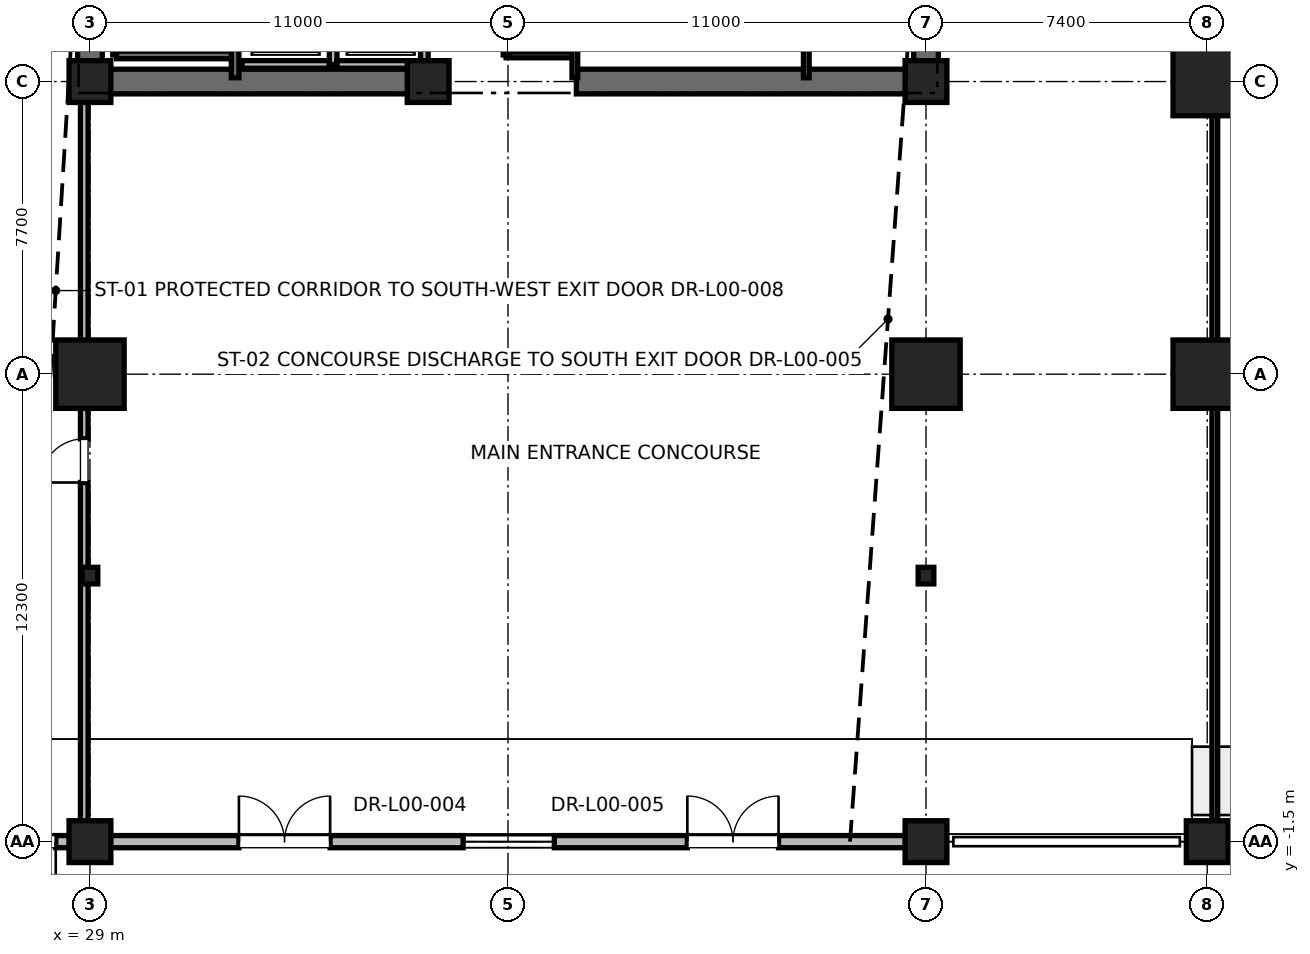
"""IFC4 building model, lengths in metres.
Left out: names, types, materials, properties, quantities, classifications, styles, units other than length and angle.
Written with IfcOpenShell. Run it as: python <this file> out.ifc"""

import sys

from ifc_helpers import new_model, si_unit, direction, frame, frame_2d, origin, origin_2d, place, context, subcontext, project, spatial, rectangle, i_section, extrude, element, fill, save


model = new_model("IFC4")
c1 = context("Model", 3, precision=1e-05, world=origin(), true_north=direction((0.0, 1.0)))
c2 = subcontext(c1, "Body", "Model", "MODEL_VIEW")
j1 = project(units=[si_unit("LENGTHUNIT", "METRE"), si_unit("PLANEANGLEUNIT", "RADIAN")], contexts=[c1])
p1 = place(None, origin())
s1 = spatial("IfcSite", under=j1, at=p1, CompositionType="ELEMENT")
p2 = place(p1, origin())
s2 = spatial("IfcBuilding", under=s1, at=p2, CompositionType="ELEMENT")
p3 = place(p2, origin())
s3 = spatial("IfcBuildingStorey", under=s2, at=p3, CompositionType="ELEMENT", Elevation=0.0)
for number, where, z_axis, x_axis in (
    (1, (29.0, 10.8, 0.0), (0.0, 0.0, 1.0), (1.0, 0.0, 0.0)),
    (2, (51.0, 10.8, 0.0), (0.0, 0.0, 1.0), (1.0, 0.0, 0.0)),
    (3, (58.4, 18.5, 0.0), (0.0, 0.0, 1.0), (1.0, 0.0, 0.0)),
    (4, (58.4, 10.8, 0.0), (0.0, 0.0, 1.0), (1.0, 0.0, 0.0)),
):
    element("IfcColumn", number, at=place(p3, frame(where, z_axis=z_axis, x_axis=x_axis)), inside=s3, PredefinedType="COLUMN", context=c2, shape_type="SweptSolid", body=[
        extrude(rectangle(XDim=1.8, YDim=1.8, at=origin_2d()), origin(), (0.0, 0.0, 1.0), 6.0),
    ])
for number, where, z_axis, x_axis in (
    (5, (29.0, 5.5, 0.0), (0.0, 0.0, 1.0), (1.0, 0.0, 0.0)),
    (6, (51.0, 5.5, 0.0), (0.0, 0.0, 1.0), (1.0, 0.0, 0.0)),
):
    element("IfcColumn", number, at=place(p3, frame(where, z_axis=z_axis, x_axis=x_axis)), inside=s3, PredefinedType="COLUMN", context=c2, shape_type="SweptSolid", body=[
        extrude(i_section(OverallWidth=0.412, OverallDepth=0.437, WebThickness=0.036, FlangeThickness=0.058, FilletRadius=0.015, at=origin_2d()), origin(), (0.0, 0.0, 1.0), 6.0),
    ])
for number, where, z_axis, x_axis in (
    (7, (29.0, 18.5, 0.0), (0.0, 0.0, 1.0), (1.0, 0.0, 0.0)),
    (8, (51.0, 18.5, 0.0), (0.0, 0.0, 1.0), (1.0, 0.0, 0.0)),
    (9, (37.9, 18.5, 0.0), (0.0, 0.0, 1.0), (1.0, 0.0, 0.0)),
):
    element("IfcColumn", number, at=place(p3, frame(where, z_axis=z_axis, x_axis=x_axis)), inside=s3, PredefinedType="PILASTER", context=c2, shape_type="SweptSolid", body=[
        extrude(rectangle(XDim=1.1, YDim=1.1, at=origin_2d()), origin(), (0.0, 0.0, 1.0), 6.0),
    ])
for number, where, z_axis, x_axis in (
    (10, (29.0, -1.5, 0.0), (0.0, 0.0, 1.0), (1.0, 0.0, 0.0)),
    (11, (51.0, -1.5, 0.0), (0.0, 0.0, 1.0), (1.0, 0.0, 0.0)),
    (12, (58.4, -1.5, 0.0), (0.0, 0.0, 1.0), (1.0, 0.0, 0.0)),
):
    element("IfcColumn", number, at=place(p3, frame(where, z_axis=z_axis, x_axis=x_axis)), inside=s3, PredefinedType="COLUMN", context=c2, shape_type="SweptSolid", body=[
        extrude(rectangle(XDim=1.1, YDim=1.1, at=origin_2d()), origin(), (0.0, 0.0, 1.0), 6.0),
    ])
for number, where, z_axis, x_axis in (
    (13, (29.0, 18.5, 0.0), (0.0, 0.0, 1.0), (1.0, 0.0, 0.0)),
    (14, (41.8, 18.5, 0.0), (0.0, 0.0, 1.0), (1.0, 0.0, 0.0)),
):
    element("IfcWall", number, at=place(p3, frame(where, z_axis=z_axis, x_axis=x_axis)), inside=s3, PredefinedType="SHEAR", context=c2, shape_type="SweptSolid", body=[
        extrude(rectangle(XDim=9.2, YDim=0.65, at=frame_2d((4.6, 0.0))), origin(), (0.0, 0.0, 1.0), 5.72),
    ])
p4 = place(p3, frame((29.0, 18.5, 0.0), z_axis=(0.0, 0.0, 1.0), x_axis=(0.0, 1.0, 0.0)))
e15 = element("IfcWall", 15, at=p4, inside=s3, PredefinedType="SHEAR", context=c2, shape_type="SweptSolid", body=[
    extrude(rectangle(XDim=8.8, YDim=0.65, at=frame_2d((4.4, 0.0))), origin(), (0.0, 0.0, 1.0), 5.72),
])
p5 = place(p3, frame((51.0, 18.5, 0.0), z_axis=(0.0, 0.0, 1.0), x_axis=(0.0, 1.0, 0.0)))
e16 = element("IfcWall", 16, at=p5, inside=s3, PredefinedType="SHEAR", context=c2, shape_type="SweptSolid", body=[
    extrude(rectangle(XDim=5.8, YDim=0.65, at=frame_2d((2.9, 0.0))), origin(), (0.0, 0.0, 1.0), 5.72),
])
p6 = place(p3, frame((28.46, -1.5, 0.0), z_axis=(0.0, 0.0, 1.0), x_axis=(-1.0, 0.0, 0.0)))
e17 = element("IfcWall", 17, at=p6, inside=s3, PredefinedType="SOLIDWALL", context=c2, shape_type="SweptSolid", body=[
    extrude(rectangle(XDim=6.32, YDim=0.32, at=frame_2d((3.16, 0.0))), origin(), (0.0, 0.0, 1.0), 4.33),
])
p7 = place(p6, frame((0.36, 0.0, 0.0)))
e18 = element("IfcOpeningElement", 18, at=p7, cuts=e17, PredefinedType="OPENING", context=c2, shape_type="SweptSolid", body=[
    extrude(rectangle(XDim=1.8, YDim=2.4, at=frame_2d((0.9, 1.2))), frame((0.0, 0.16, 0.0), z_axis=(0.0, -1.0, 0.0), x_axis=(1.0, 0.0, 0.0)), (0.0, 0.0, 1.0), 0.32),
])
p8 = place(p3, frame((29.54, -1.5, 0.0), z_axis=(0.0, 0.0, 1.0), x_axis=(1.0, 0.0, 0.0)))
e19 = element("IfcWall", 19, at=p8, inside=s3, PredefinedType="SOLIDWALL", context=c2, shape_type="SweptSolid", body=[
    extrude(rectangle(XDim=20.92, YDim=0.32, at=frame_2d((10.46, 0.0))), origin(), (0.0, 0.0, 1.0), 4.33),
])
p9 = place(p8, frame((3.38, 0.0, 0.0)))
e20 = element("IfcOpeningElement", 20, at=p9, cuts=e19, PredefinedType="OPENING", context=c2, shape_type="SweptSolid", body=[
    extrude(rectangle(XDim=2.4, YDim=2.8, at=frame_2d((1.2, 1.4))), frame((0.0, 0.16, 0.0), z_axis=(0.0, -1.0, 0.0), x_axis=(1.0, 0.0, 0.0)), (0.0, 0.0, 1.0), 0.32),
])
p10 = place(p8, frame((9.28, 0.0, 0.9)))
e21 = element("IfcOpeningElement", 21, at=p10, cuts=e19, PredefinedType="OPENING", context=c2, shape_type="SweptSolid", body=[
    extrude(rectangle(XDim=2.4, YDim=2.4, at=frame_2d((1.2, 1.2))), frame((0.0, 0.16, 0.0), z_axis=(0.0, -1.0, 0.0), x_axis=(1.0, 0.0, 0.0)), (0.0, 0.0, 1.0), 0.32),
])
p11 = place(p8, frame((15.18, 0.0, 0.0)))
e22 = element("IfcOpeningElement", 22, at=p11, cuts=e19, PredefinedType="OPENING", context=c2, shape_type="SweptSolid", body=[
    extrude(rectangle(XDim=2.4, YDim=2.8, at=frame_2d((1.2, 1.4))), frame((0.0, 0.16, 0.0), z_axis=(0.0, -1.0, 0.0), x_axis=(1.0, 0.0, 0.0)), (0.0, 0.0, 1.0), 0.32),
])
p12 = place(p3, frame((29.7, 19.2, 0.0), z_axis=(0.0, 0.0, 1.0), x_axis=(0.0, 1.0, 0.0)))
e23 = element("IfcWall", 23, at=p12, inside=s3, PredefinedType="SOLIDWALL", context=c2, shape_type="SweptSolid", body=[
    extrude(rectangle(XDim=8.15, YDim=0.2, at=frame_2d((4.075, 0.0))), origin(), (0.0, 0.0, 1.0), 5.72),
])
p13 = place(p3, frame((29.7, 19.2, 0.0), z_axis=(0.0, 0.0, 1.0), x_axis=(1.0, 0.0, 0.0)))
e24 = element("IfcWall", 24, at=p13, inside=s3, PredefinedType="SOLIDWALL", context=c2, shape_type="SweptSolid", body=[
    extrude(rectangle(XDim=3.12, YDim=0.2, at=frame_2d((1.56, 0.0))), origin(), (0.0, 0.0, 1.0), 5.72),
])
p14 = place(p3, frame((32.82, 18.6, 0.0), z_axis=(0.0, 0.0, 1.0), x_axis=(0.0, 1.0, 0.0)))
e25 = element("IfcWall", 25, at=p14, inside=s3, PredefinedType="SOLIDWALL", context=c2, shape_type="SweptSolid", body=[
    extrude(rectangle(XDim=8.78, YDim=0.2, at=frame_2d((4.39, 0.0))), origin(), (0.0, 0.0, 1.0), 5.72),
])
p15 = place(p3, frame((33.0, 18.95, 0.0), z_axis=(0.0, 0.0, 1.0), x_axis=(1.0, 0.0, 0.0)))
e26 = element("IfcWall", 26, at=p15, inside=s3, PredefinedType="SOLIDWALL", context=c2, shape_type="SweptSolid", body=[
    extrude(rectangle(XDim=2.3, YDim=0.2, at=frame_2d((1.15, 0.0))), origin(), (0.0, 0.0, 1.0), 5.72),
])
p16 = place(p3, frame((35.4, 18.95, 0.0), z_axis=(0.0, 0.0, 1.0), x_axis=(0.0, 1.0, 0.0)))
e27 = element("IfcWall", 27, at=p16, inside=s3, PredefinedType="SOLIDWALL", context=c2, shape_type="SweptSolid", body=[
    extrude(rectangle(XDim=2.6, YDim=0.2, at=frame_2d((1.3, 0.0))), origin(), (0.0, 0.0, 1.0), 5.72),
])
p17 = place(p3, frame((35.5, 18.95, 0.0), z_axis=(0.0, 0.0, 1.0), x_axis=(1.0, 0.0, 0.0)))
e28 = element("IfcWall", 28, at=p17, inside=s3, PredefinedType="SOLIDWALL", context=c2, shape_type="SweptSolid", body=[
    extrude(rectangle(XDim=2.3, YDim=0.2, at=frame_2d((1.15, 0.0))), origin(), (0.0, 0.0, 1.0), 4.5),
])
p18 = place(p3, frame((37.8, 18.95, 0.0), z_axis=(0.0, 0.0, 1.0), x_axis=(0.0, 1.0, 0.0)))
e29 = element("IfcWall", 29, at=p18, inside=s3, PredefinedType="SOLIDWALL", context=c2, shape_type="SweptSolid", body=[
    extrude(rectangle(XDim=2.6, YDim=0.2, at=frame_2d((1.3, 0.0))), origin(), (0.0, 0.0, 1.0), 4.5),
])
p19 = place(p3, frame((39.95, 19.2, 0.0), z_axis=(0.0, 0.0, 1.0), x_axis=(1.0, 0.0, 0.0)))
e30 = element("IfcWall", 30, at=p19, inside=s3, PredefinedType="PARTITIONING", context=c2, shape_type="SweptSolid", body=[
    extrude(rectangle(XDim=1.81, YDim=0.15, at=frame_2d((0.905, 0.0))), origin(), (0.0, 0.0, 1.0), 2.85),
])
p20 = place(p3, frame((41.76, 18.6, 0.0), z_axis=(0.0, 0.0, 1.0), x_axis=(0.0, 1.0, 0.0)))
e31 = element("IfcWall", 31, at=p20, inside=s3, PredefinedType="PARTITIONING", context=c2, shape_type="SweptSolid", body=[
    extrude(rectangle(XDim=3.6, YDim=0.15, at=frame_2d((1.8, 0.0))), origin(), (0.0, 0.0, 1.0), 2.85),
])
p21 = place(p3, frame((39.95, 19.2, 0.0), z_axis=(0.0, 0.0, 1.0), x_axis=(0.0, 1.0, 0.0)))
e32 = element("IfcWall", 32, at=p21, inside=s3, PredefinedType="PARTITIONING", context=c2, shape_type="SweptSolid", body=[
    extrude(rectangle(XDim=3.0, YDim=0.15, at=frame_2d((1.5, 0.0))), origin(), (0.0, 0.0, 1.0), 2.85),
])
p22 = place(p21, frame((1.05, 0.0, 0.0)))
e33 = element("IfcOpeningElement", 33, at=p22, cuts=e32, PredefinedType="OPENING", context=c2, shape_type="SweptSolid", body=[
    extrude(rectangle(XDim=0.9, YDim=2.1, at=frame_2d((0.45, 1.05))), frame((0.0, 0.075, 0.0), z_axis=(0.0, -1.0, 0.0), x_axis=(1.0, 0.0, 0.0)), (0.0, 0.0, 1.0), 0.15),
])
p23 = place(p3, frame((47.85, 18.6, 0.0), z_axis=(0.0, 0.0, 1.0), x_axis=(0.0, 1.0, 0.0)))
e34 = element("IfcWall", 34, at=p23, inside=s3, PredefinedType="PARTITIONING", context=c2, shape_type="SweptSolid", body=[
    extrude(rectangle(XDim=2.54, YDim=0.15, at=frame_2d((1.27, 0.0))), origin(), (0.0, 0.0, 1.0), 2.85),
])
p24 = place(p3, frame((28.85, -1.35, 0.0), z_axis=(0.0, 0.0, 1.0), x_axis=(0.0, 1.0, 0.0)))
e35 = element("IfcWall", 35, at=p24, inside=s3, PredefinedType="PARTITIONING", context=c2, shape_type="SweptSolid", body=[
    extrude(rectangle(XDim=19.75, YDim=0.2, at=frame_2d((9.875, 0.0))), origin(), (0.0, 0.0, 1.0), 2.85),
])
p25 = place(p24, frame((9.3, 0.0, 0.0)))
e36 = element("IfcOpeningElement", 36, at=p25, cuts=e35, PredefinedType="OPENING", context=c2, shape_type="SweptSolid", body=[
    extrude(rectangle(XDim=1.15, YDim=2.2, at=frame_2d((0.575, 1.1))), frame((0.0, 0.1, 0.0), z_axis=(0.0, -1.0, 0.0), x_axis=(1.0, 0.0, 0.0)), (0.0, 0.0, 1.0), 0.2),
])
p26 = place(p3, frame((58.6, -1.35, 0.0), z_axis=(0.0, 0.0, 1.0), x_axis=(0.0, 1.0, 0.0)))
e37 = element("IfcWall", 37, at=p26, inside=s3, PredefinedType="PARTITIONING", context=c2, shape_type="SweptSolid", body=[
    extrude(rectangle(XDim=22.75, YDim=0.15, at=frame_2d((11.375, 0.0))), origin(), (0.0, 0.0, 1.0), 2.85),
])
p27 = place(p26, frame((20.85, 0.0, 0.0)))
e38 = element("IfcOpeningElement", 38, at=p27, cuts=e37, PredefinedType="OPENING", context=c2, shape_type="SweptSolid", body=[
    extrude(rectangle(XDim=1.0, YDim=2.15, at=frame_2d((0.5, 1.075))), frame((0.0, 0.075, 0.0), z_axis=(0.0, -1.0, 0.0), x_axis=(1.0, 0.0, 0.0)), (0.0, 0.0, 1.0), 0.15),
])
p28 = place(p7, origin())
e39 = element("IfcDoor", 39, at=p28, inside=s3, OperationType="DOUBLE_DOOR_SINGLE_SWING", PredefinedType="DOOR", context=c2, shape_type="SweptSolid", body=[
    extrude(rectangle(XDim=1.8, YDim=2.4, at=frame_2d((0.9, 1.2))), frame((0.0, 0.025, 0.0), z_axis=(0.0, -1.0, 0.0), x_axis=(1.0, 0.0, 0.0)), (0.0, 0.0, 1.0), 0.05),
])
fill(e18, e39)
p29 = place(p9, origin())
e40 = element("IfcDoor", 40, at=p29, inside=s3, OperationType="DOUBLE_DOOR_SINGLE_SWING", PredefinedType="DOOR", context=c2, shape_type="SweptSolid", body=[
    extrude(rectangle(XDim=2.4, YDim=2.8, at=frame_2d((1.2, 1.4))), frame((0.0, 0.025, 0.0), z_axis=(0.0, -1.0, 0.0), x_axis=(1.0, 0.0, 0.0)), (0.0, 0.0, 1.0), 0.05),
])
fill(e20, e40)
p30 = place(p10, origin())
e41 = element("IfcWindow", 41, at=p30, inside=s3, PartitioningType="SINGLE_PANEL", PredefinedType="WINDOW", context=c2, shape_type="SweptSolid", body=[
    extrude(rectangle(XDim=2.4, YDim=2.4, at=frame_2d((1.2, 1.2))), frame((0.0, 0.03, 0.0), z_axis=(0.0, -1.0, 0.0), x_axis=(1.0, 0.0, 0.0)), (0.0, 0.0, 1.0), 0.06),
])
fill(e21, e41)
p31 = place(p11, origin())
e42 = element("IfcDoor", 42, at=p31, inside=s3, OperationType="DOUBLE_DOOR_SINGLE_SWING", PredefinedType="DOOR", context=c2, shape_type="SweptSolid", body=[
    extrude(rectangle(XDim=2.4, YDim=2.8, at=frame_2d((1.2, 1.4))), frame((0.0, 0.025, 0.0), z_axis=(0.0, -1.0, 0.0), x_axis=(1.0, 0.0, 0.0)), (0.0, 0.0, 1.0), 0.05),
])
fill(e22, e42)
p32 = place(p25, origin())
e43 = element("IfcDoor", 43, at=p32, inside=s3, OperationType="SINGLE_SWING_LEFT", PredefinedType="DOOR", context=c2, shape_type="SweptSolid", body=[
    extrude(rectangle(XDim=1.15, YDim=2.2, at=frame_2d((0.575, 1.1))), frame((0.0, 0.025, 0.0), z_axis=(0.0, -1.0, 0.0), x_axis=(1.0, 0.0, 0.0)), (0.0, 0.0, 1.0), 0.05),
])
fill(e36, e43)
save(model, sys.argv[1])
